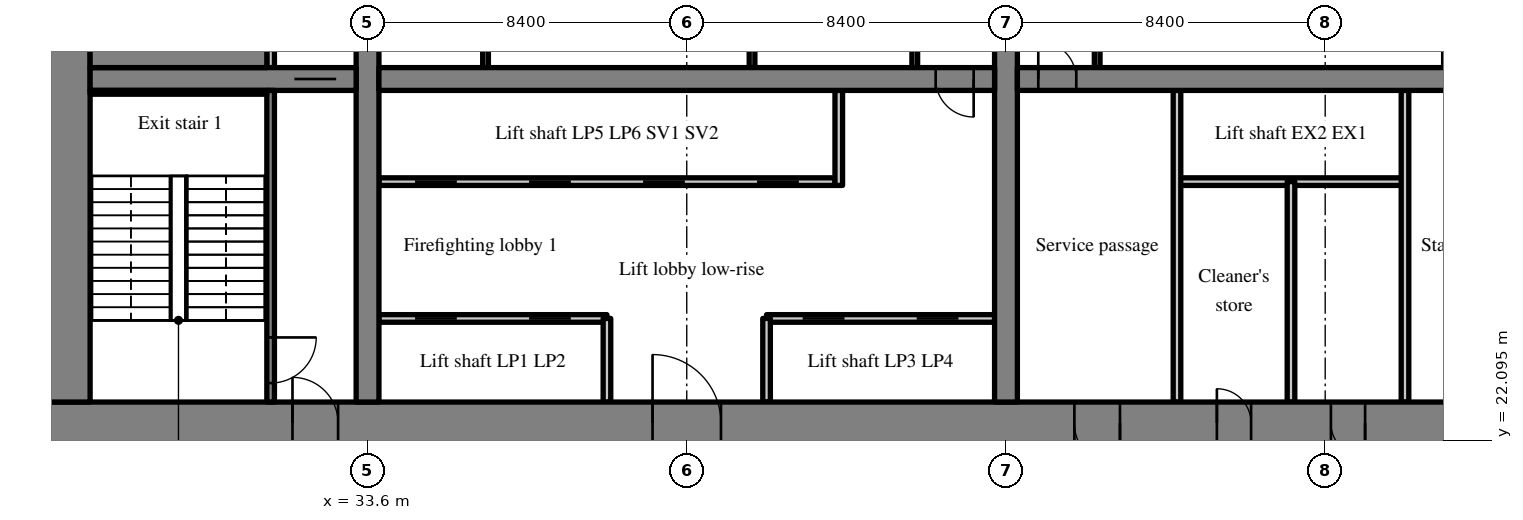
"""IFC4 building model, lengths in metres.
Left out: names, types, materials, properties, quantities, classifications, styles, units other than length and angle.
Written with IfcOpenShell. Run it as: python <this file> out.ifc"""

import sys

from ifc_helpers import new_model, si_unit, direction, frame, frame_2d, origin, place, context, subcontext, project, spatial, rectangle, extrude, source, transform, mapped, element, fill, save


model = new_model("IFC4")
c1 = context("Model", 3, precision=1e-05, world=origin(), true_north=direction((0.0, 1.0)))
c2 = subcontext(c1, "Body", "Model", "MODEL_VIEW")
j1 = project(units=[si_unit("LENGTHUNIT", "METRE"), si_unit("PLANEANGLEUNIT", "RADIAN")], contexts=[c1])
p1 = place(None, origin())
s1 = spatial("IfcSite", under=j1, at=p1, CompositionType="ELEMENT")
p2 = place(p1, origin())
s2 = spatial("IfcBuilding", under=s1, at=p2, CompositionType="ELEMENT")
p3 = place(p2, frame((0.0, 0.0, 43.0)))
s3 = spatial("IfcBuildingStorey", under=s2, at=p3, CompositionType="ELEMENT", Elevation=43.0)
m1 = source(origin(), c2, "Body", "SweptSolid", [
    extrude(rectangle(XDim=50.4, YDim=1.1, at=frame_2d((25.2, 0.0))), origin(), (0.0, 0.0, 1.0), 3.52),
])
p4 = place(p3, frame((25.2, 22.55, 0.0), z_axis=(0.0, 0.0, 1.0), x_axis=(1.0, 0.0, 0.0)))
e1 = element("IfcWall", 1, at=p4, inside=s3, PredefinedType="SHEAR", context=c2, shape_type="MappedRepresentation", body=[
    mapped(m1, transform((0.0, 0.0, 0.0), scale=1.0)),
])
m2 = source(origin(), c2, "Body", "SweptSolid", [
    extrude(rectangle(XDim=1.8, YDim=2.1, at=frame_2d((0.9, 1.05))), frame((0.0, 0.56, 0.0), z_axis=(0.0, -1.0, 0.0), x_axis=(1.0, 0.0, 0.0)), (0.0, 0.0, 1.0), 1.12),
])
p5 = place(p4, frame((15.9, 0.0, 0.0)))
e2 = element("IfcOpeningElement", 2, at=p5, cuts=e1, PredefinedType="OPENING", context=c2, shape_type="MappedRepresentation", body=[
    mapped(m2, transform((0.0, 0.0, 0.0), scale=1.0)),
])
m3 = source(origin(), c2, "Body", "SweptSolid", [
    extrude(rectangle(XDim=1.2, YDim=2.1, at=frame_2d((0.6, 1.05))), frame((0.0, 0.56, 0.0), z_axis=(0.0, -1.0, 0.0), x_axis=(1.0, 0.0, 0.0)), (0.0, 0.0, 1.0), 1.12),
])
p6 = place(p4, frame((27.0, 0.0, 0.0)))
e3 = element("IfcOpeningElement", 3, at=p6, cuts=e1, PredefinedType="OPENING", context=c2, shape_type="MappedRepresentation", body=[
    mapped(m3, transform((0.0, 0.0, 0.0), scale=1.0)),
])
m4 = source(origin(), c2, "Body", "SweptSolid", [
    extrude(rectangle(XDim=0.9, YDim=2.1, at=frame_2d((0.45, 1.05))), frame((0.0, 0.56, 0.0), z_axis=(0.0, -1.0, 0.0), x_axis=(1.0, 0.0, 0.0)), (0.0, 0.0, 1.0), 1.12),
])
p7 = place(p4, frame((33.75, 0.0, 0.0)))
e4 = element("IfcOpeningElement", 4, at=p7, cuts=e1, PredefinedType="OPENING", context=c2, shape_type="MappedRepresentation", body=[
    mapped(m4, transform((0.0, 0.0, 0.0), scale=1.0)),
])
p8 = place(p4, frame((30.75, 0.0, 0.0)))
e5 = element("IfcOpeningElement", 5, at=p8, cuts=e1, PredefinedType="OPENING", context=c2, shape_type="MappedRepresentation", body=[
    mapped(m4, transform((0.0, 0.0, 0.0), scale=1.0)),
])
p9 = place(p4, frame((39.75, 0.0, 0.0)))
e6 = element("IfcOpeningElement", 6, at=p9, cuts=e1, PredefinedType="OPENING", context=c2, shape_type="MappedRepresentation", body=[
    mapped(m4, transform((0.0, 0.0, 0.0), scale=1.0)),
])
p10 = place(p4, frame((36.75, 0.0, 0.0)))
e7 = element("IfcOpeningElement", 7, at=p10, cuts=e1, PredefinedType="OPENING", context=c2, shape_type="MappedRepresentation", body=[
    mapped(m4, transform((0.0, 0.0, 0.0), scale=1.0)),
])
p11 = place(p4, frame((6.425, 0.0, 0.0)))
e8 = element("IfcOpeningElement", 8, at=p11, cuts=e1, PredefinedType="OPENING", context=c2, shape_type="MappedRepresentation", body=[
    mapped(m3, transform((0.0, 0.0, 0.0), scale=1.0)),
])
p12 = place(p4, frame((47.675, 0.0, 0.0)))
e9 = element("IfcOpeningElement", 9, at=p12, cuts=e1, PredefinedType="OPENING", context=c2, shape_type="MappedRepresentation", body=[
    mapped(m3, transform((0.0, 0.0, 0.0), scale=1.0)),
])
m5 = source(origin(), c2, "Body", "SweptSolid", [
    extrude(rectangle(XDim=17.8, YDim=1.1, at=frame_2d((8.9, 0.0))), origin(), (0.0, 0.0, 1.0), 3.52),
])
p13 = place(p3, frame((25.75, 23.1, 0.0), z_axis=(0.0, 0.0, 1.0), x_axis=(0.0, 1.0, 0.0)))
e10 = element("IfcWall", 10, at=p13, inside=s3, PredefinedType="SHEAR", context=c2, shape_type="MappedRepresentation", body=[
    mapped(m5, transform((0.0, 0.0, 0.0), scale=1.0)),
])
m6 = source(origin(), c2, "Body", "SweptSolid", [
    extrude(rectangle(XDim=17.8, YDim=0.6, at=frame_2d((8.9, 0.0))), origin(), (0.0, 0.0, 1.0), 3.52),
])
p14 = place(p3, frame((33.6, 23.1, 0.0), z_axis=(0.0, 0.0, 1.0), x_axis=(0.0, 1.0, 0.0)))
e11 = element("IfcWall", 11, at=p14, inside=s3, PredefinedType="SHEAR", context=c2, shape_type="MappedRepresentation", body=[
    mapped(m6, transform((0.0, 0.0, 0.0), scale=1.0)),
])
m7 = source(origin(), c2, "Body", "SweptSolid", [
    extrude(rectangle(XDim=1.1, YDim=2.1, at=frame_2d((0.55, 1.05))), frame((0.0, 0.31, 0.0), z_axis=(0.0, -1.0, 0.0), x_axis=(1.0, 0.0, 0.0)), (0.0, 0.0, 1.0), 0.62),
])
p15 = place(p14, frame((12.35, 0.0, 0.0)))
e12 = element("IfcOpeningElement", 12, at=p15, cuts=e11, PredefinedType="OPENING", context=c2, shape_type="MappedRepresentation", body=[
    mapped(m7, transform((0.0, 0.0, 0.0), scale=1.0)),
])
p16 = place(p3, frame((50.4, 23.1, 0.0), z_axis=(0.0, 0.0, 1.0), x_axis=(0.0, 1.0, 0.0)))
e13 = element("IfcWall", 13, at=p16, inside=s3, PredefinedType="SHEAR", context=c2, shape_type="MappedRepresentation", body=[
    mapped(m6, transform((0.0, 0.0, 0.0), scale=1.0)),
])
p17 = place(p16, frame((12.35, 0.0, 0.0)))
e14 = element("IfcOpeningElement", 14, at=p17, cuts=e13, PredefinedType="OPENING", context=c2, shape_type="MappedRepresentation", body=[
    mapped(m7, transform((0.0, 0.0, 0.0), scale=1.0)),
])
m8 = source(origin(), c2, "Body", "SweptSolid", [
    extrude(rectangle(XDim=7.0, YDim=0.6, at=frame_2d((3.5, 0.0))), origin(), (0.0, 0.0, 1.0), 3.52),
])
p18 = place(p3, frame((26.3, 31.6, 0.0), z_axis=(0.0, 0.0, 1.0), x_axis=(1.0, 0.0, 0.0)))
e15 = element("IfcWall", 15, at=p18, inside=s3, PredefinedType="SHEAR", context=c2, shape_type="MappedRepresentation", body=[
    mapped(m8, transform((0.0, 0.0, 0.0), scale=1.0)),
])
p19 = place(p18, frame((5.375, 0.0, 0.0)))
e16 = element("IfcOpeningElement", 16, at=p19, cuts=e15, PredefinedType="OPENING", context=c2, shape_type="MappedRepresentation", body=[
    mapped(m7, transform((0.0, 0.0, 0.0), scale=1.0)),
])
m9 = source(origin(), c2, "Body", "SweptSolid", [
    extrude(rectangle(XDim=16.2, YDim=0.6, at=frame_2d((8.1, 0.0))), origin(), (0.0, 0.0, 1.0), 3.52),
])
p20 = place(p3, frame((33.9, 31.6, 0.0), z_axis=(0.0, 0.0, 1.0), x_axis=(1.0, 0.0, 0.0)))
e17 = element("IfcWall", 17, at=p20, inside=s3, PredefinedType="SHEAR", context=c2, shape_type="MappedRepresentation", body=[
    mapped(m9, transform((0.0, 0.0, 0.0), scale=1.0)),
])
m10 = source(origin(), c2, "Body", "SweptSolid", [
    extrude(rectangle(XDim=1.0, YDim=2.1, at=frame_2d((0.5, 1.05))), frame((0.0, 0.31, 0.0), z_axis=(0.0, -1.0, 0.0), x_axis=(1.0, 0.0, 0.0)), (0.0, 0.0, 1.0), 0.62),
])
p21 = place(p20, frame((14.65, 0.0, 0.0)))
e18 = element("IfcOpeningElement", 18, at=p21, cuts=e17, PredefinedType="OPENING", context=c2, shape_type="MappedRepresentation", body=[
    mapped(m10, transform((0.0, 0.0, 0.0), scale=1.0)),
])
m11 = source(origin(), c2, "Body", "SweptSolid", [
    extrude(rectangle(XDim=16.2, YDim=0.6, at=frame_2d((8.1, 0.0))), origin(), (0.0, 0.0, 1.0), 3.52),
])
p22 = place(p3, frame((50.7, 31.6, 0.0), z_axis=(0.0, 0.0, 1.0), x_axis=(1.0, 0.0, 0.0)))
e19 = element("IfcWall", 19, at=p22, inside=s3, PredefinedType="SHEAR", context=c2, shape_type="MappedRepresentation", body=[
    mapped(m11, transform((0.0, 0.0, 0.0), scale=1.0)),
])
p23 = place(p22, frame((0.55, 0.0, 0.0)))
e20 = element("IfcOpeningElement", 20, at=p23, cuts=e19, PredefinedType="OPENING", context=c2, shape_type="MappedRepresentation", body=[
    mapped(m10, transform((0.0, 0.0, 0.0), scale=1.0)),
])
m12 = source(origin(), c2, "Body", "SweptSolid", [
    extrude(rectangle(XDim=6.0, YDim=0.2, at=frame_2d((3.0, 0.0))), origin(), (0.0, 0.0, 1.0), 3.52),
])
p24 = place(p3, frame((33.9, 25.3, 0.0), z_axis=(0.0, 0.0, 1.0), x_axis=(1.0, 0.0, 0.0)))
e21 = element("IfcWall", 21, at=p24, inside=s3, PredefinedType="SOLIDWALL", context=c2, shape_type="MappedRepresentation", body=[
    mapped(m12, transform((0.0, 0.0, 0.0), scale=1.0)),
])
m13 = source(origin(), c2, "Body", "SweptSolid", [
    extrude(rectangle(XDim=1.1, YDim=2.1, at=frame_2d((0.55, 1.05))), frame((0.0, 0.11, 0.0), z_axis=(0.0, -1.0, 0.0), x_axis=(1.0, 0.0, 0.0)), (0.0, 0.0, 1.0), 0.22),
])
p25 = place(p24, frame((0.95, 0.0, 0.0)))
e22 = element("IfcOpeningElement", 22, at=p25, cuts=e21, PredefinedType="OPENING", context=c2, shape_type="MappedRepresentation", body=[
    mapped(m13, transform((0.0, 0.0, 0.0), scale=1.0)),
])
p26 = place(p24, frame((3.95, 0.0, 0.0)))
e23 = element("IfcOpeningElement", 23, at=p26, cuts=e21, PredefinedType="OPENING", context=c2, shape_type="MappedRepresentation", body=[
    mapped(m13, transform((0.0, 0.0, 0.0), scale=1.0)),
])
p27 = place(p3, frame((44.1, 25.3, 0.0), z_axis=(0.0, 0.0, 1.0), x_axis=(1.0, 0.0, 0.0)))
e24 = element("IfcWall", 24, at=p27, inside=s3, PredefinedType="SOLIDWALL", context=c2, shape_type="MappedRepresentation", body=[
    mapped(m12, transform((0.0, 0.0, 0.0), scale=1.0)),
])
p28 = place(p27, frame((0.95, 0.0, 0.0)))
e25 = element("IfcOpeningElement", 25, at=p28, cuts=e24, PredefinedType="OPENING", context=c2, shape_type="MappedRepresentation", body=[
    mapped(m13, transform((0.0, 0.0, 0.0), scale=1.0)),
])
p29 = place(p27, frame((3.95, 0.0, 0.0)))
e26 = element("IfcOpeningElement", 26, at=p29, cuts=e24, PredefinedType="OPENING", context=c2, shape_type="MappedRepresentation", body=[
    mapped(m13, transform((0.0, 0.0, 0.0), scale=1.0)),
])
m14 = source(origin(), c2, "Body", "SweptSolid", [
    extrude(rectangle(XDim=12.0, YDim=0.2, at=frame_2d((6.0, 0.0))), origin(), (0.0, 0.0, 1.0), 3.52),
])
p30 = place(p3, frame((33.9, 28.9, 0.0), z_axis=(0.0, 0.0, 1.0), x_axis=(1.0, 0.0, 0.0)))
e27 = element("IfcWall", 27, at=p30, inside=s3, PredefinedType="SOLIDWALL", context=c2, shape_type="MappedRepresentation", body=[
    mapped(m14, transform((0.0, 0.0, 0.0), scale=1.0)),
])
p31 = place(p30, frame((0.95, 0.0, 0.0)))
e28 = element("IfcOpeningElement", 28, at=p31, cuts=e27, PredefinedType="OPENING", context=c2, shape_type="MappedRepresentation", body=[
    mapped(m13, transform((0.0, 0.0, 0.0), scale=1.0)),
])
p32 = place(p30, frame((3.95, 0.0, 0.0)))
e29 = element("IfcOpeningElement", 29, at=p32, cuts=e27, PredefinedType="OPENING", context=c2, shape_type="MappedRepresentation", body=[
    mapped(m13, transform((0.0, 0.0, 0.0), scale=1.0)),
])
p33 = place(p30, frame((6.95, 0.0, 0.0)))
e30 = element("IfcOpeningElement", 30, at=p33, cuts=e27, PredefinedType="OPENING", context=c2, shape_type="MappedRepresentation", body=[
    mapped(m13, transform((0.0, 0.0, 0.0), scale=1.0)),
])
p34 = place(p30, frame((9.95, 0.0, 0.0)))
e31 = element("IfcOpeningElement", 31, at=p34, cuts=e27, PredefinedType="OPENING", context=c2, shape_type="MappedRepresentation", body=[
    mapped(m13, transform((0.0, 0.0, 0.0), scale=1.0)),
])
m15 = source(origin(), c2, "Body", "SweptSolid", [
    extrude(rectangle(XDim=2.2, YDim=0.2, at=frame_2d((1.1, 0.0))), origin(), (0.0, 0.0, 1.0), 3.52),
])
for number, where, z_axis, x_axis in (
    (32, (39.9, 23.1, 0.0), (0.0, 0.0, 1.0), (0.0, 1.0, 0.0)),
    (33, (44.1, 23.1, 0.0), (0.0, 0.0, 1.0), (0.0, 1.0, 0.0)),
):
    element("IfcWall", number, at=place(p3, frame(where, z_axis=z_axis, x_axis=x_axis)), inside=s3, PredefinedType="SOLIDWALL", context=c2, shape_type="MappedRepresentation", body=[
        mapped(m15, transform((0.0, 0.0, 0.0), scale=1.0)),
    ])
m16 = source(origin(), c2, "Body", "SweptSolid", [
    extrude(rectangle(XDim=2.5, YDim=0.2, at=frame_2d((1.25, 0.0))), origin(), (0.0, 0.0, 1.0), 3.52),
])
p35 = place(p3, frame((46.0, 28.8, 0.0), z_axis=(0.0, 0.0, 1.0), x_axis=(0.0, 1.0, 0.0)))
e34 = element("IfcWall", 34, at=p35, inside=s3, PredefinedType="SOLIDWALL", context=c2, shape_type="MappedRepresentation", body=[
    mapped(m16, transform((0.0, 0.0, 0.0), scale=1.0)),
])
m17 = source(origin(), c2, "Body", "SweptSolid", [
    extrude(rectangle(XDim=3.1, YDim=0.15, at=frame_2d((1.55, 0.0))), origin(), (0.0, 0.0, 1.0), 3.52),
])
for number, where, z_axis, x_axis in (
    (35, (48.0, 31.9, 0.0), (0.0, 0.0, 1.0), (0.0, 1.0, 0.0)),
    (36, (36.705, 31.9, 0.0), (0.0, 0.0, 1.0), (0.0, 1.0, 0.0)),
    (37, (43.718, 31.9, 0.0), (0.0, 0.0, 1.0), (0.0, 1.0, 0.0)),
):
    element("IfcWall", number, at=place(p3, frame(where, z_axis=z_axis, x_axis=x_axis)), inside=s3, PredefinedType="PARTITIONING", context=c2, shape_type="MappedRepresentation", body=[
        mapped(m17, transform((0.0, 0.0, 0.0), scale=1.0)),
    ])
p36 = place(p3, frame((60.9, 28.9, 0.0), z_axis=(0.0, 0.0, 1.0), x_axis=(-1.0, 0.0, 0.0)))
e38 = element("IfcWall", 38, at=p36, inside=s3, PredefinedType="SOLIDWALL", context=c2, shape_type="MappedRepresentation", body=[
    mapped(m12, transform((0.0, 0.0, 0.0), scale=1.0)),
])
m18 = source(origin(), c2, "Body", "SweptSolid", [
    extrude(rectangle(XDim=8.2, YDim=0.2, at=frame_2d((4.1, 0.0))), origin(), (0.0, 0.0, 1.0), 3.52),
])
for number, where, z_axis, x_axis in (
    (39, (54.9, 23.1, 0.0), (0.0, 0.0, 1.0), (0.0, 1.0, 0.0)),
    (40, (60.9, 23.1, 0.0), (0.0, 0.0, 1.0), (0.0, 1.0, 0.0)),
):
    element("IfcWall", number, at=place(p3, frame(where, z_axis=z_axis, x_axis=x_axis)), inside=s3, PredefinedType="PARTITIONING", context=c2, shape_type="MappedRepresentation", body=[
        mapped(m18, transform((0.0, 0.0, 0.0), scale=1.0)),
    ])
m19 = source(origin(), c2, "Body", "SweptSolid", [
    extrude(rectangle(XDim=5.8, YDim=0.2, at=frame_2d((2.9, 0.0))), origin(), (0.0, 0.0, 1.0), 3.52),
])
p37 = place(p3, frame((57.9, 23.1, 0.0), z_axis=(0.0, 0.0, 1.0), x_axis=(0.0, 1.0, 0.0)))
e41 = element("IfcWall", 41, at=p37, inside=s3, PredefinedType="PARTITIONING", context=c2, shape_type="MappedRepresentation", body=[
    mapped(m19, transform((0.0, 0.0, 0.0), scale=1.0)),
])
p38 = place(p3, frame((52.8, 31.9, 0.0), z_axis=(0.0, 0.0, 1.0), x_axis=(0.0, 1.0, 0.0)))
e42 = element("IfcWall", 42, at=p38, inside=s3, PredefinedType="PARTITIONING", context=c2, shape_type="MappedRepresentation", body=[
    mapped(m17, transform((0.0, 0.0, 0.0), scale=1.0)),
])
m20 = source(origin(), c2, "Body", "SweptSolid", [
    extrude(rectangle(XDim=8.2, YDim=0.2, at=frame_2d((4.1, 0.0))), origin(), (0.0, 0.0, 1.0), 3.52),
])
p39 = place(p3, frame((31.05, 23.1, 0.0), z_axis=(0.0, 0.0, 1.0), x_axis=(0.0, 1.0, 0.0)))
e43 = element("IfcWall", 43, at=p39, inside=s3, PredefinedType="SOLIDWALL", context=c2, shape_type="MappedRepresentation", body=[
    mapped(m20, transform((0.0, 0.0, 0.0), scale=1.0)),
])
m21 = source(origin(), c2, "Body", "SweptSolid", [
    extrude(rectangle(XDim=1.2, YDim=2.1, at=frame_2d((0.6, 1.05))), frame((0.0, 0.11, 0.0), z_axis=(0.0, -1.0, 0.0), x_axis=(1.0, 0.0, 0.0)), (0.0, 0.0, 1.0), 0.22),
])
p40 = place(p39, frame((0.5, 0.0, 0.0)))
e44 = element("IfcOpeningElement", 44, at=p40, cuts=e43, PredefinedType="OPENING", context=c2, shape_type="MappedRepresentation", body=[
    mapped(m21, transform((0.0, 0.0, 0.0), scale=1.0)),
])
m22 = source(origin(), c2, "Body", "SweptSolid", [
    extrude(rectangle(XDim=1.7, YDim=0.2, at=frame_2d((0.85, 0.0))), origin(), (0.0, 0.0, 1.0), 3.52),
])
p41 = place(p3, frame((31.05, 31.9, 0.0), z_axis=(0.0, 0.0, 1.0), x_axis=(0.0, 1.0, 0.0)))
e45 = element("IfcWall", 45, at=p41, inside=s3, PredefinedType="SOLIDWALL", context=c2, shape_type="MappedRepresentation", body=[
    mapped(m22, transform((0.0, 0.0, 0.0), scale=1.0)),
])
m23 = source(origin(), c2, "Body", "SweptSolid", [
    extrude(rectangle(XDim=4.65, YDim=0.1, at=frame_2d((2.325, 0.0))), origin(), (0.0, 0.0, 1.0), 3.52),
])
p42 = place(p3, frame((26.3, 31.25, 0.0), z_axis=(0.0, 0.0, 1.0), x_axis=(1.0, 0.0, 0.0)))
e46 = element("IfcWall", 46, at=p42, inside=s3, PredefinedType="SOLIDWALL", context=c2, shape_type="MappedRepresentation", body=[
    mapped(m23, transform((0.0, 0.0, 0.0), scale=1.0)),
])
m24 = source(origin(), c2, "Body", "SweptSolid", [
    extrude(rectangle(XDim=4.65, YDim=0.9, at=frame_2d((2.325, 0.0))), origin(), (0.0, 0.0, 1.0), 3.52),
])
p43 = place(p3, frame((26.3, 32.35, 0.0), z_axis=(0.0, 0.0, 1.0), x_axis=(1.0, 0.0, 0.0)))
e47 = element("IfcWall", 47, at=p43, inside=s3, PredefinedType="SOLIDWALL", context=c2, shape_type="MappedRepresentation", body=[
    mapped(m24, transform((0.0, 0.0, 0.0), scale=1.0)),
])
m25 = source(origin(), c2, "Body", "SweptSolid", [
    extrude(rectangle(XDim=1.8, YDim=2.1, at=frame_2d((0.9, 1.05))), frame((0.0, 0.325, 0.0), z_axis=(0.0, -1.0, 0.0), x_axis=(1.0, 0.0, 0.0)), (0.0, 0.0, 1.0), 0.05),
])
p44 = place(p5, origin())
e48 = element("IfcDoor", 48, at=p44, inside=s3, OperationType="DOUBLE_DOOR_SINGLE_SWING", PredefinedType="DOOR", context=c2, shape_type="MappedRepresentation", body=[
    mapped(m25, transform((0.0, 0.0, 0.0), scale=1.0)),
])
fill(e2, e48)
m26 = source(origin(), c2, "Body", "SweptSolid", [
    extrude(rectangle(XDim=1.0, YDim=2.1, at=frame_2d((0.5, 1.05))), frame((0.0, 0.025, 0.0), z_axis=(0.0, -1.0, 0.0), x_axis=(1.0, 0.0, 0.0)), (0.0, 0.0, 1.0), 0.05),
])
p45 = place(p21, origin())
e49 = element("IfcDoor", 49, at=p45, inside=s3, OperationType="SINGLE_SWING_RIGHT", PredefinedType="DOOR", context=c2, shape_type="MappedRepresentation", body=[
    mapped(m26, transform((0.0, 0.0, 0.0), scale=1.0)),
])
fill(e18, e49)
m27 = source(origin(), c2, "Body", "SweptSolid", [
    extrude(rectangle(XDim=1.1, YDim=2.1, at=frame_2d((0.55, 1.05))), frame((0.0, 0.025, 0.0), z_axis=(0.0, -1.0, 0.0), x_axis=(1.0, 0.0, 0.0)), (0.0, 0.0, 1.0), 0.05),
])
p46 = place(p25, origin())
e50 = element("IfcDoor", 50, at=p46, inside=s3, OperationType="SLIDING_TO_LEFT", PredefinedType="DOOR", context=c2, shape_type="MappedRepresentation", body=[
    mapped(m27, transform((0.0, 0.0, 0.0), scale=1.0)),
])
fill(e22, e50)
p47 = place(p26, origin())
e51 = element("IfcDoor", 51, at=p47, inside=s3, OperationType="SLIDING_TO_RIGHT", PredefinedType="DOOR", context=c2, shape_type="MappedRepresentation", body=[
    mapped(m27, transform((0.0, 0.0, 0.0), scale=1.0)),
])
fill(e23, e51)
p48 = place(p28, origin())
e52 = element("IfcDoor", 52, at=p48, inside=s3, OperationType="SLIDING_TO_LEFT", PredefinedType="DOOR", context=c2, shape_type="MappedRepresentation", body=[
    mapped(m27, transform((0.0, 0.0, 0.0), scale=1.0)),
])
fill(e25, e52)
p49 = place(p29, origin())
e53 = element("IfcDoor", 53, at=p49, inside=s3, OperationType="SLIDING_TO_RIGHT", PredefinedType="DOOR", context=c2, shape_type="MappedRepresentation", body=[
    mapped(m27, transform((0.0, 0.0, 0.0), scale=1.0)),
])
fill(e26, e53)
p50 = place(p31, origin())
e54 = element("IfcDoor", 54, at=p50, inside=s3, OperationType="SLIDING_TO_LEFT", PredefinedType="DOOR", context=c2, shape_type="MappedRepresentation", body=[
    mapped(m27, transform((0.0, 0.0, 0.0), scale=1.0)),
])
fill(e28, e54)
p51 = place(p32, origin())
e55 = element("IfcDoor", 55, at=p51, inside=s3, OperationType="SLIDING_TO_RIGHT", PredefinedType="DOOR", context=c2, shape_type="MappedRepresentation", body=[
    mapped(m27, transform((0.0, 0.0, 0.0), scale=1.0)),
])
fill(e29, e55)
p52 = place(p33, origin())
e56 = element("IfcDoor", 56, at=p52, inside=s3, OperationType="SLIDING_TO_LEFT", PredefinedType="DOOR", context=c2, shape_type="MappedRepresentation", body=[
    mapped(m27, transform((0.0, 0.0, 0.0), scale=1.0)),
])
fill(e30, e56)
p53 = place(p34, origin())
e57 = element("IfcDoor", 57, at=p53, inside=s3, OperationType="SLIDING_TO_RIGHT", PredefinedType="DOOR", context=c2, shape_type="MappedRepresentation", body=[
    mapped(m27, transform((0.0, 0.0, 0.0), scale=1.0)),
])
fill(e31, e57)
m28 = source(origin(), c2, "Body", "SweptSolid", [
    extrude(rectangle(XDim=1.2, YDim=2.1, at=frame_2d((0.6, 1.05))), frame((0.0, 0.325, 0.0), z_axis=(0.0, -1.0, 0.0), x_axis=(1.0, 0.0, 0.0)), (0.0, 0.0, 1.0), 0.05),
])
p54 = place(p6, origin())
e58 = element("IfcDoor", 58, at=p54, inside=s3, OperationType="SINGLE_SWING_RIGHT", PredefinedType="DOOR", context=c2, shape_type="MappedRepresentation", body=[
    mapped(m28, transform((0.0, 0.0, 0.0), scale=1.0)),
])
fill(e3, e58)
p55 = place(p23, origin())
e59 = element("IfcDoor", 59, at=p55, inside=s3, OperationType="SINGLE_SWING_LEFT", PredefinedType="DOOR", context=c2, shape_type="MappedRepresentation", body=[
    mapped(m26, transform((0.0, 0.0, 0.0), scale=1.0)),
])
fill(e20, e59)
m29 = source(origin(), c2, "Body", "SweptSolid", [
    extrude(rectangle(XDim=0.9, YDim=2.1, at=frame_2d((0.45, 1.05))), frame((0.0, 0.325, 0.0), z_axis=(0.0, -1.0, 0.0), x_axis=(1.0, 0.0, 0.0)), (0.0, 0.0, 1.0), 0.05),
])
p56 = place(p7, origin())
e60 = element("IfcDoor", 60, at=p56, inside=s3, OperationType="SINGLE_SWING_RIGHT", PredefinedType="DOOR", context=c2, shape_type="MappedRepresentation", body=[
    mapped(m29, transform((0.0, 0.0, 0.0), scale=1.0)),
])
fill(e4, e60)
p57 = place(p8, origin())
e61 = element("IfcDoor", 61, at=p57, inside=s3, OperationType="SINGLE_SWING_LEFT", PredefinedType="DOOR", context=c2, shape_type="MappedRepresentation", body=[
    mapped(m29, transform((0.0, 0.0, 0.0), scale=1.0)),
])
fill(e5, e61)
m30 = source(origin(), c2, "Body", "SweptSolid", [
    extrude(rectangle(XDim=1.2, YDim=2.1, at=frame_2d((0.6, 1.05))), frame((0.0, 0.025, 0.0), z_axis=(0.0, -1.0, 0.0), x_axis=(1.0, 0.0, 0.0)), (0.0, 0.0, 1.0), 0.05),
])
p58 = place(p40, origin())
e62 = element("IfcDoor", 62, at=p58, inside=s3, OperationType="SINGLE_SWING_RIGHT", PredefinedType="DOOR", context=c2, shape_type="MappedRepresentation", body=[
    mapped(m30, transform((0.0, 0.0, 0.0), scale=1.0)),
])
fill(e44, e62)
p59 = place(p11, origin())
e63 = element("IfcDoor", 63, at=p59, inside=s3, OperationType="SINGLE_SWING_LEFT", PredefinedType="DOOR", context=c2, shape_type="MappedRepresentation", body=[
    mapped(m28, transform((0.0, 0.0, 0.0), scale=1.0)),
])
fill(e8, e63)
p60 = place(p19, origin())
e64 = element("IfcDoor", 64, at=p60, inside=s3, OperationType="SLIDING_TO_RIGHT", PredefinedType="DOOR", context=c2, shape_type="MappedRepresentation", body=[
    mapped(m27, transform((0.0, 0.0, 0.0), scale=1.0)),
])
fill(e16, e64)
save(model, sys.argv[1])
